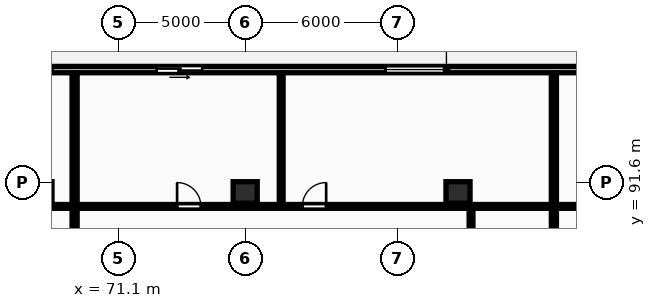
"""IFC4 building model, lengths in metres.
Left out: names, types, materials, properties, quantities, classifications, styles, units other than length and angle.
Written with IfcOpenShell. Run it as: python <this file> out.ifc"""

import sys

from ifc_helpers import new_model, si_unit, direction, frame, frame_2d, origin, origin_2d, place, context, subcontext, project, spatial, rectangle, extrude, element, fill, save


model = new_model("IFC4")
c1 = context("Model", 3, precision=1e-05, world=origin(), true_north=direction((0.0, 1.0)))
c2 = subcontext(c1, "Body", "Model", "MODEL_VIEW")
j1 = project(units=[si_unit("LENGTHUNIT", "METRE"), si_unit("PLANEANGLEUNIT", "RADIAN")], contexts=[c1])
p1 = place(None, origin())
s1 = spatial("IfcSite", under=j1, at=p1, CompositionType="ELEMENT")
p2 = place(p1, origin())
s2 = spatial("IfcBuilding", under=s1, at=p2, CompositionType="ELEMENT")
p3 = place(p2, frame((0.0, 0.0, 80.8)))
s3 = spatial("IfcBuildingStorey", under=s2, at=p3, CompositionType="ELEMENT", Elevation=80.8)
for number, where, z_axis, x_axis in (
    (1, (76.1, 91.2, 0.0), (0.0, 0.0, 1.0), (1.0, 0.0, 0.0)),
    (2, (84.5, 91.2, 0.0), (0.0, 0.0, 1.0), (1.0, 0.0, 0.0)),
):
    element("IfcColumn", number, at=place(p3, frame(where, z_axis=z_axis, x_axis=x_axis)), inside=s3, PredefinedType="COLUMN", context=c2, shape_type="SweptSolid", body=[
        extrude(rectangle(XDim=0.95, YDim=0.85, at=origin_2d()), origin(), (0.0, 0.0, 1.0), 3.25),
    ])
p4 = place(p3, frame((130.6, 96.05, 0.0), z_axis=(0.0, 0.0, 1.0), x_axis=(-1.0, 0.0, 0.0)))
e3 = element("IfcWall", 3, at=p4, inside=s3, PredefinedType="STANDARD", context=c2, shape_type="SweptSolid", body=[
    extrude(rectangle(XDim=73.0, YDim=0.25, at=frame_2d((36.5, 0.0))), origin(), (0.0, 0.0, 1.0), 2.97),
])
p5 = place(p4, frame((67.867, 0.0, 0.0)))
e4 = element("IfcOpeningElement", 4, at=p5, cuts=e3, PredefinedType="OPENING", context=c2, shape_type="SweptSolid", body=[
    extrude(rectangle(XDim=1.8, YDim=2.2, at=frame_2d((0.9, 1.1))), frame((0.0, 0.135, 0.0), z_axis=(0.0, -1.0, 0.0), x_axis=(1.0, 0.0, 0.0)), (0.0, 0.0, 1.0), 0.27),
])
p6 = place(p4, frame((62.103, 0.0, 0.85)))
e5 = element("IfcOpeningElement", 5, at=p6, cuts=e3, PredefinedType="OPENING", context=c2, shape_type="SweptSolid", body=[
    extrude(rectangle(XDim=1.8, YDim=1.8, at=frame_2d((0.9, 0.9))), frame((0.0, 0.135, 0.0), z_axis=(0.0, -1.0, 0.0), x_axis=(1.0, 0.0, 0.0)), (0.0, 0.0, 1.0), 0.27),
])
p7 = place(p4, frame((56.196, 0.0, 0.0)))
e6 = element("IfcOpeningElement", 6, at=p7, cuts=e3, PredefinedType="OPENING", context=c2, shape_type="SweptSolid", body=[
    extrude(rectangle(XDim=1.8, YDim=2.2, at=frame_2d((0.9, 1.1))), frame((0.0, 0.135, 0.0), z_axis=(0.0, -1.0, 0.0), x_axis=(1.0, 0.0, 0.0)), (0.0, 0.0, 1.0), 0.27),
])
p8 = place(p4, frame((46.557, 0.0, 0.85)))
e7 = element("IfcOpeningElement", 7, at=p8, cuts=e3, PredefinedType="OPENING", context=c2, shape_type="SweptSolid", body=[
    extrude(rectangle(XDim=2.4, YDim=1.9, at=frame_2d((1.2, 0.95))), frame((0.0, 0.135, 0.0), z_axis=(0.0, -1.0, 0.0), x_axis=(1.0, 0.0, 0.0)), (0.0, 0.0, 1.0), 0.27),
])
p9 = place(p4, frame((36.714, 0.0, 0.0)))
e8 = element("IfcOpeningElement", 8, at=p9, cuts=e3, PredefinedType="OPENING", context=c2, shape_type="SweptSolid", body=[
    extrude(rectangle(XDim=1.8, YDim=2.2, at=frame_2d((0.9, 1.1))), frame((0.0, 0.135, 0.0), z_axis=(0.0, -1.0, 0.0), x_axis=(1.0, 0.0, 0.0)), (0.0, 0.0, 1.0), 0.27),
])
p10 = place(p4, frame((30.483, 0.0, 0.85)))
e9 = element("IfcOpeningElement", 9, at=p10, cuts=e3, PredefinedType="OPENING", context=c2, shape_type="SweptSolid", body=[
    extrude(rectangle(XDim=1.8, YDim=1.8, at=frame_2d((0.9, 0.9))), frame((0.0, 0.135, 0.0), z_axis=(0.0, -1.0, 0.0), x_axis=(1.0, 0.0, 0.0)), (0.0, 0.0, 1.0), 0.27),
])
p11 = place(p4, frame((21.604, 0.0, 0.85)))
e10 = element("IfcOpeningElement", 10, at=p11, cuts=e3, PredefinedType="OPENING", context=c2, shape_type="SweptSolid", body=[
    extrude(rectangle(XDim=2.4, YDim=1.9, at=frame_2d((1.2, 0.95))), frame((0.0, 0.135, 0.0), z_axis=(0.0, -1.0, 0.0), x_axis=(1.0, 0.0, 0.0)), (0.0, 0.0, 1.0), 0.27),
])
p12 = place(p4, frame((17.698, 0.0, 0.85)))
e11 = element("IfcOpeningElement", 11, at=p12, cuts=e3, PredefinedType="OPENING", context=c2, shape_type="SweptSolid", body=[
    extrude(rectangle(XDim=1.8, YDim=1.8, at=frame_2d((0.9, 0.9))), frame((0.0, 0.135, 0.0), z_axis=(0.0, -1.0, 0.0), x_axis=(1.0, 0.0, 0.0)), (0.0, 0.0, 1.0), 0.27),
])
p13 = place(p4, frame((26.363, 0.0, 0.0)))
e12 = element("IfcOpeningElement", 12, at=p13, cuts=e3, PredefinedType="OPENING", context=c2, shape_type="SweptSolid", body=[
    extrude(rectangle(XDim=1.8, YDim=2.2, at=frame_2d((0.9, 1.1))), frame((0.0, 0.135, 0.0), z_axis=(0.0, -1.0, 0.0), x_axis=(1.0, 0.0, 0.0)), (0.0, 0.0, 1.0), 0.27),
])
p14 = place(p4, frame((13.753, 0.0, 0.85)))
e13 = element("IfcOpeningElement", 13, at=p14, cuts=e3, PredefinedType="OPENING", context=c2, shape_type="SweptSolid", body=[
    extrude(rectangle(XDim=1.8, YDim=1.8, at=frame_2d((0.9, 0.9))), frame((0.0, 0.135, 0.0), z_axis=(0.0, -1.0, 0.0), x_axis=(1.0, 0.0, 0.0)), (0.0, 0.0, 1.0), 0.27),
])
p15 = place(p4, frame((7.363, 0.0, 0.0)))
e14 = element("IfcOpeningElement", 14, at=p15, cuts=e3, PredefinedType="OPENING", context=c2, shape_type="SweptSolid", body=[
    extrude(rectangle(XDim=1.8, YDim=2.2, at=frame_2d((0.9, 1.1))), frame((0.0, 0.135, 0.0), z_axis=(0.0, -1.0, 0.0), x_axis=(1.0, 0.0, 0.0)), (0.0, 0.0, 1.0), 0.27),
])
p16 = place(p4, frame((0.9, 0.0, 0.85)))
e15 = element("IfcOpeningElement", 15, at=p16, cuts=e3, PredefinedType="OPENING", context=c2, shape_type="SweptSolid", body=[
    extrude(rectangle(XDim=2.4, YDim=1.9, at=frame_2d((1.2, 0.95))), frame((0.0, 0.135, 0.0), z_axis=(0.0, -1.0, 0.0), x_axis=(1.0, 0.0, 0.0)), (0.0, 0.0, 1.0), 0.27),
])
p17 = place(p3, frame((69.367, 69.43, 0.0), z_axis=(0.0, 0.0, 1.0), x_axis=(0.0, 1.0, 0.0)))
e16 = element("IfcWall", 16, at=p17, inside=s3, PredefinedType="PARTITIONING", context=c2, shape_type="SweptSolid", body=[
    extrude(rectangle(XDim=26.47, YDim=0.2, at=frame_2d((13.235, 0.0))), origin(), (0.0, 0.0, 1.0), 2.97),
])
p18 = place(p3, frame((57.68, 90.65, 0.0), z_axis=(0.0, 0.0, 1.0), x_axis=(1.0, 0.0, 0.0)))
e17 = element("IfcWall", 17, at=p18, inside=s3, PredefinedType="PARTITIONING", context=c2, shape_type="SweptSolid", body=[
    extrude(rectangle(XDim=11.607, YDim=0.15, at=frame_2d((5.803, 0.0))), origin(), (0.0, 0.0, 1.0), 2.97),
])
p19 = place(p18, frame((5.333, 0.0, 0.0)))
e18 = element("IfcOpeningElement", 18, at=p19, cuts=e17, PredefinedType="OPENING", context=c2, shape_type="SweptSolid", body=[
    extrude(rectangle(XDim=0.94, YDim=2.1, at=frame_2d((0.47, 1.05))), frame((0.0, 0.085, 0.0), z_axis=(0.0, -1.0, 0.0), x_axis=(1.0, 0.0, 0.0)), (0.0, 0.0, 1.0), 0.17),
])
p20 = place(p3, frame((88.285, 69.43, 0.0), z_axis=(0.0, 0.0, 1.0), x_axis=(0.0, 1.0, 0.0)))
e19 = element("IfcWall", 19, at=p20, inside=s3, PredefinedType="PARTITIONING", context=c2, shape_type="SweptSolid", body=[
    extrude(rectangle(XDim=26.47, YDim=0.2, at=frame_2d((13.235, 0.0))), origin(), (0.0, 0.0, 1.0), 2.97),
])
p21 = place(p3, frame((85.015, 69.41, 0.0), z_axis=(0.0, 0.0, 1.0), x_axis=(0.0, 1.0, 0.0)))
e20 = element("IfcWall", 20, at=p21, inside=s3, PredefinedType="PARTITIONING", context=c2, shape_type="SweptSolid", body=[
    extrude(rectangle(XDim=21.18, YDim=0.15, at=frame_2d((10.59, 0.0))), origin(), (0.0, 0.0, 1.0), 2.97),
])
p22 = place(p21, frame((2.406, 0.0, 0.0)))
e21 = element("IfcOpeningElement", 21, at=p22, cuts=e20, PredefinedType="OPENING", context=c2, shape_type="SweptSolid", body=[
    extrude(rectangle(XDim=0.96, YDim=2.1, at=frame_2d((0.48, 1.05))), frame((0.0, 0.085, 0.0), z_axis=(0.0, -1.0, 0.0), x_axis=(1.0, 0.0, 0.0)), (0.0, 0.0, 1.0), 0.17),
])
p23 = place(p21, frame((6.133, 0.0, 0.0)))
e22 = element("IfcOpeningElement", 22, at=p23, cuts=e20, PredefinedType="OPENING", context=c2, shape_type="SweptSolid", body=[
    extrude(rectangle(XDim=0.88, YDim=2.06, at=frame_2d((0.44, 1.03))), frame((0.0, 0.085, 0.0), z_axis=(0.0, -1.0, 0.0), x_axis=(1.0, 0.0, 0.0)), (0.0, 0.0, 1.0), 0.17),
])
p24 = place(p21, frame((12.003, 0.0, 0.0)))
e23 = element("IfcOpeningElement", 23, at=p24, cuts=e20, PredefinedType="OPENING", context=c2, shape_type="SweptSolid", body=[
    extrude(rectangle(XDim=0.84, YDim=2.04, at=frame_2d((0.42, 1.02))), frame((0.0, 0.085, 0.0), z_axis=(0.0, -1.0, 0.0), x_axis=(1.0, 0.0, 0.0)), (0.0, 0.0, 1.0), 0.17),
])
p25 = place(p3, frame((77.521, 90.73, 0.0), z_axis=(0.0, 0.0, 1.0), x_axis=(0.0, 1.0, 0.0)))
e24 = element("IfcWall", 24, at=p25, inside=s3, PredefinedType="PARTITIONING", context=c2, shape_type="SweptSolid", body=[
    extrude(rectangle(XDim=5.17, YDim=0.15, at=frame_2d((2.585, 0.0))), origin(), (0.0, 0.0, 1.0), 2.97),
])
p26 = place(p3, frame((69.447, 90.65, 0.0), z_axis=(0.0, 0.0, 1.0), x_axis=(1.0, 0.0, 0.0)))
e25 = element("IfcWall", 25, at=p26, inside=s3, PredefinedType="PARTITIONING", context=c2, shape_type="SweptSolid", body=[
    extrude(rectangle(XDim=18.758, YDim=0.15, at=frame_2d((9.379, 0.0))), origin(), (0.0, 0.0, 1.0), 2.97),
])
p27 = place(p26, frame((3.965, 0.0, 0.0)))
e26 = element("IfcOpeningElement", 26, at=p27, cuts=e25, PredefinedType="OPENING", context=c2, shape_type="SweptSolid", body=[
    extrude(rectangle(XDim=0.94, YDim=2.1, at=frame_2d((0.47, 1.05))), frame((0.0, 0.085, 0.0), z_axis=(0.0, -1.0, 0.0), x_axis=(1.0, 0.0, 0.0)), (0.0, 0.0, 1.0), 0.17),
])
p28 = place(p26, frame((8.909, 0.0, 0.0)))
e27 = element("IfcOpeningElement", 27, at=p28, cuts=e25, PredefinedType="OPENING", context=c2, shape_type="SweptSolid", body=[
    extrude(rectangle(XDim=0.94, YDim=2.1, at=frame_2d((0.47, 1.05))), frame((0.0, 0.085, 0.0), z_axis=(0.0, -1.0, 0.0), x_axis=(1.0, 0.0, 0.0)), (0.0, 0.0, 1.0), 0.17),
])
p29 = place(p3, frame((88.365, 90.65, 0.0), z_axis=(0.0, 0.0, 1.0), x_axis=(1.0, 0.0, 0.0)))
e28 = element("IfcWall", 28, at=p29, inside=s3, PredefinedType="PARTITIONING", context=c2, shape_type="SweptSolid", body=[
    extrude(rectangle(XDim=12.543, YDim=0.15, at=frame_2d((6.271, 0.0))), origin(), (0.0, 0.0, 1.0), 2.97),
])
p30 = place(p29, frame((7.081, 0.0, 0.0)))
e29 = element("IfcOpeningElement", 29, at=p30, cuts=e28, PredefinedType="OPENING", context=c2, shape_type="SweptSolid", body=[
    extrude(rectangle(XDim=0.94, YDim=2.1, at=frame_2d((0.47, 1.05))), frame((0.0, 0.085, 0.0), z_axis=(0.0, -1.0, 0.0), x_axis=(1.0, 0.0, 0.0)), (0.0, 0.0, 1.0), 0.17),
])
p31 = place(p6, origin())
e30 = element("IfcWindow", 30, at=p31, inside=s3, PartitioningType="SINGLE_PANEL", PredefinedType="WINDOW", context=c2, shape_type="SweptSolid", body=[
    extrude(rectangle(XDim=1.8, YDim=1.8, at=frame_2d((0.9, 0.9))), frame((0.0, 0.03, 0.0), z_axis=(0.0, -1.0, 0.0), x_axis=(1.0, 0.0, 0.0)), (0.0, 0.0, 1.0), 0.06),
])
fill(e5, e30)
p32 = place(p7, origin())
e31 = element("IfcDoor", 31, at=p32, inside=s3, OperationType="SLIDING_TO_LEFT", PredefinedType="DOOR", context=c2, shape_type="SweptSolid", body=[
    extrude(rectangle(XDim=1.8, YDim=2.2, at=frame_2d((0.9, 1.1))), frame((0.0, 0.025, 0.0), z_axis=(0.0, -1.0, 0.0), x_axis=(1.0, 0.0, 0.0)), (0.0, 0.0, 1.0), 0.05),
])
fill(e6, e31)
p33 = place(p8, origin())
e32 = element("IfcWindow", 32, at=p33, inside=s3, PartitioningType="DOUBLE_PANEL_VERTICAL", PredefinedType="WINDOW", context=c2, shape_type="SweptSolid", body=[
    extrude(rectangle(XDim=2.4, YDim=1.9, at=frame_2d((1.2, 0.95))), frame((0.0, 0.03, 0.0), z_axis=(0.0, -1.0, 0.0), x_axis=(1.0, 0.0, 0.0)), (0.0, 0.0, 1.0), 0.06),
])
fill(e7, e32)
p34 = place(p27, origin())
e33 = element("IfcDoor", 33, at=p34, inside=s3, OperationType="SINGLE_SWING_LEFT", PredefinedType="DOOR", context=c2, shape_type="SweptSolid", body=[
    extrude(rectangle(XDim=0.94, YDim=2.1, at=frame_2d((0.47, 1.05))), frame((0.0, 0.025, 0.0), z_axis=(0.0, -1.0, 0.0), x_axis=(1.0, 0.0, 0.0)), (0.0, 0.0, 1.0), 0.05),
])
fill(e26, e33)
p35 = place(p28, origin())
e34 = element("IfcDoor", 34, at=p35, inside=s3, OperationType="SINGLE_SWING_RIGHT", PredefinedType="DOOR", context=c2, shape_type="SweptSolid", body=[
    extrude(rectangle(XDim=0.94, YDim=2.1, at=frame_2d((0.47, 1.05))), frame((0.0, 0.025, 0.0), z_axis=(0.0, -1.0, 0.0), x_axis=(1.0, 0.0, 0.0)), (0.0, 0.0, 1.0), 0.05),
])
fill(e27, e34)
save(model, sys.argv[1])
